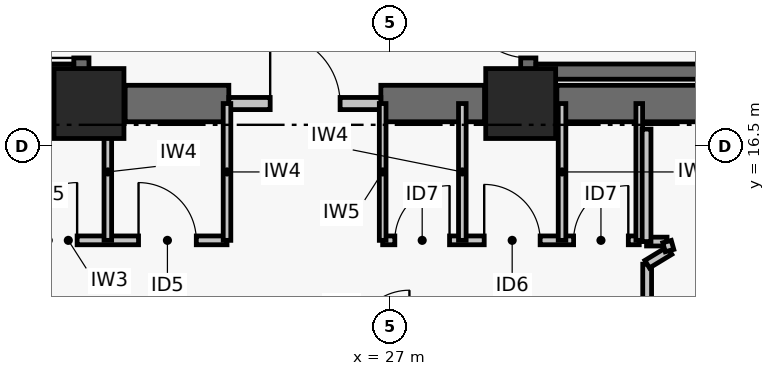
"""IFC4 building model, lengths in metres.
Left out: names, types, materials, properties, quantities, classifications, styles, units other than length and angle.
Written with IfcOpenShell. Run it as: python <this file> out.ifc"""

import sys

from ifc_helpers import new_model, si_unit, direction, frame, frame_2d, origin, origin_2d, place, context, subcontext, project, spatial, rectangle, extrude, element, fill, save


model = new_model("IFC4")
c1 = context("Model", 3, precision=1e-05, world=origin(), true_north=direction((0.0, 1.0)))
c2 = subcontext(c1, "Body", "Model", "MODEL_VIEW")
j1 = project(units=[si_unit("LENGTHUNIT", "METRE"), si_unit("PLANEANGLEUNIT", "RADIAN")], contexts=[c1])
p1 = place(None, origin())
s1 = spatial("IfcSite", under=j1, at=p1, CompositionType="ELEMENT")
p2 = place(p1, origin())
s2 = spatial("IfcBuilding", under=s1, at=p2, CompositionType="ELEMENT")
p3 = place(p2, frame((0.0, 0.0, 38.76)))
s3 = spatial("IfcBuildingStorey", under=s2, at=p3, CompositionType="ELEMENT", Elevation=38.76)
for number, where, z_axis, x_axis in (
    (1, (22.05, 17.2, 0.0), (0.0, 0.0, 1.0), (1.0, 0.0, 0.0)),
    (2, (29.15, 17.2, 0.0), (0.0, 0.0, 1.0), (1.0, 0.0, 0.0)),
):
    element("IfcColumn", number, at=place(p3, frame(where, z_axis=z_axis, x_axis=x_axis)), inside=s3, PredefinedType="COLUMN", context=c2, shape_type="SweptSolid", body=[
        extrude(rectangle(XDim=1.15, YDim=1.15, at=origin_2d()), origin(), (0.0, 0.0, 1.0), 3.72),
    ])
p4 = place(p3, frame((18.395, 17.2, 0.0), z_axis=(0.0, 0.0, 1.0), x_axis=(1.0, 0.0, 0.0)))
e3 = element("IfcWall", 3, at=p4, inside=s3, PredefinedType="SHEAR", context=c2, shape_type="SweptSolid", body=[
    extrude(rectangle(XDim=3.06, YDim=0.6, at=frame_2d((1.53, 0.0))), origin(), (0.0, 0.0, 1.0), 3.47),
])
p5 = place(p3, frame((22.645, 17.2, 0.0), z_axis=(0.0, 0.0, 1.0), x_axis=(1.0, 0.0, 0.0)))
e4 = element("IfcWall", 4, at=p5, inside=s3, PredefinedType="SHEAR", context=c2, shape_type="SweptSolid", body=[
    extrude(rectangle(XDim=1.705, YDim=0.6, at=frame_2d((0.853, 0.0))), origin(), (0.0, 0.0, 1.0), 3.47),
])
p6 = place(p3, frame((26.85, 17.2, 0.0), z_axis=(0.0, 0.0, 1.0), x_axis=(1.0, 0.0, 0.0)))
e5 = element("IfcWall", 5, at=p6, inside=s3, PredefinedType="SHEAR", context=c2, shape_type="SweptSolid", body=[
    extrude(rectangle(XDim=1.705, YDim=0.6, at=frame_2d((0.853, 0.0))), origin(), (0.0, 0.0, 1.0), 3.47),
])
p7 = place(p3, frame((29.745, 17.2, 0.0), z_axis=(0.0, 0.0, 1.0), x_axis=(1.0, 0.0, 0.0)))
e6 = element("IfcWall", 6, at=p7, inside=s3, PredefinedType="SHEAR", context=c2, shape_type="SweptSolid", body=[
    extrude(rectangle(XDim=3.06, YDim=0.6, at=frame_2d((1.53, 0.0))), origin(), (0.0, 0.0, 1.0), 3.47),
])
p8 = place(p3, frame((21.925, 17.6, 0.0), z_axis=(0.0, 0.0, 1.0), x_axis=(0.0, 1.0, 0.0)))
e7 = element("IfcWall", 7, at=p8, inside=s3, PredefinedType="SHEAR", context=c2, shape_type="SweptSolid", body=[
    extrude(rectangle(XDim=8.8, YDim=0.25, at=frame_2d((4.4, 0.0))), origin(), (0.0, 0.0, 1.0), 3.47),
])
p9 = place(p8, frame((0.35, 0.0, 0.0)))
e8 = element("IfcOpeningElement", 8, at=p9, cuts=e7, PredefinedType="OPENING", context=c2, shape_type="SweptSolid", body=[
    extrude(rectangle(XDim=1.05, YDim=2.08, at=frame_2d((0.525, 1.04))), frame((0.0, 0.135, 0.0), z_axis=(0.0, -1.0, 0.0), x_axis=(1.0, 0.0, 0.0)), (0.0, 0.0, 1.0), 0.27),
])
p10 = place(p3, frame((18.354, 17.725, 0.0), z_axis=(0.0, 0.0, 1.0), x_axis=(1.0, 0.0, 0.0)))
e9 = element("IfcWall", 9, at=p10, inside=s3, PredefinedType="SHEAR", context=c2, shape_type="SweptSolid", body=[
    extrude(rectangle(XDim=3.446, YDim=0.25, at=frame_2d((1.723, 0.0))), origin(), (0.0, 0.0, 1.0), 3.47),
])
p11 = place(p3, frame((29.275, 17.6, 0.0), z_axis=(0.0, 0.0, 1.0), x_axis=(0.0, 1.0, 0.0)))
e10 = element("IfcWall", 10, at=p11, inside=s3, PredefinedType="SHEAR", context=c2, shape_type="SweptSolid", body=[
    extrude(rectangle(XDim=8.8, YDim=0.25, at=frame_2d((4.4, 0.0))), origin(), (0.0, 0.0, 1.0), 3.47),
])
p12 = place(p11, frame((0.35, 0.0, 0.0)))
e11 = element("IfcOpeningElement", 11, at=p12, cuts=e10, PredefinedType="OPENING", context=c2, shape_type="SweptSolid", body=[
    extrude(rectangle(XDim=1.05, YDim=2.08, at=frame_2d((0.525, 1.04))), frame((0.0, 0.135, 0.0), z_axis=(0.0, -1.0, 0.0), x_axis=(1.0, 0.0, 0.0)), (0.0, 0.0, 1.0), 0.27),
])
p13 = place(p3, frame((29.4, 17.725, 0.0), z_axis=(0.0, 0.0, 1.0), x_axis=(1.0, 0.0, 0.0)))
e12 = element("IfcWall", 12, at=p13, inside=s3, PredefinedType="SHEAR", context=c2, shape_type="SweptSolid", body=[
    extrude(rectangle(XDim=3.446, YDim=0.25, at=frame_2d((1.723, 0.0))), origin(), (0.0, 0.0, 1.0), 3.47),
])
p14 = place(p3, frame((24.35, 17.2, 0.0), z_axis=(0.0, 0.0, 1.0), x_axis=(1.0, 0.0, 0.0)))
e13 = element("IfcWall", 13, at=p14, inside=s3, PredefinedType="PARTITIONING", context=c2, shape_type="SweptSolid", body=[
    extrude(rectangle(XDim=2.5, YDim=0.2, at=frame_2d((1.25, 0.0))), origin(), (0.0, 0.0, 1.0), 2.6),
])
p15 = place(p14, frame((0.68, 0.0, 0.0)))
e14 = element("IfcOpeningElement", 14, at=p15, cuts=e13, PredefinedType="OPENING", context=c2, shape_type="SweptSolid", body=[
    extrude(rectangle(XDim=1.15, YDim=2.08, at=frame_2d((0.575, 1.04))), frame((0.0, 0.11, 0.0), z_axis=(0.0, -1.0, 0.0), x_axis=(1.0, 0.0, 0.0)), (0.0, 0.0, 1.0), 0.22),
])
p16 = place(p3, frame((19.1, 14.95, 0.0), z_axis=(0.0, 0.0, 1.0), x_axis=(1.0, 0.0, 0.0)))
e15 = element("IfcWall", 15, at=p16, inside=s3, PredefinedType="PARTITIONING", context=c2, shape_type="SweptSolid", body=[
    extrude(rectangle(XDim=5.22, YDim=0.145, at=frame_2d((2.61, 0.0))), origin(), (0.0, 0.0, 1.0), 2.6),
])
p17 = place(p16, frame((0.2, 0.0, 0.0)))
e16 = element("IfcOpeningElement", 16, at=p17, cuts=e15, PredefinedType="OPENING", context=c2, shape_type="SweptSolid", body=[
    extrude(rectangle(XDim=0.9, YDim=2.02, at=frame_2d((0.45, 1.01))), frame((0.0, 0.083, 0.0), z_axis=(0.0, -1.0, 0.0), x_axis=(1.0, 0.0, 0.0)), (0.0, 0.0, 1.0), 0.165),
])
p18 = place(p16, frame((1.805, 0.0, 0.0)))
e17 = element("IfcOpeningElement", 17, at=p18, cuts=e15, PredefinedType="OPENING", context=c2, shape_type="SweptSolid", body=[
    extrude(rectangle(XDim=0.95, YDim=2.06, at=frame_2d((0.475, 1.03))), frame((0.0, 0.083, 0.0), z_axis=(0.0, -1.0, 0.0), x_axis=(1.0, 0.0, 0.0)), (0.0, 0.0, 1.0), 0.165),
])
p19 = place(p16, frame((3.765, 0.0, 0.0)))
e18 = element("IfcOpeningElement", 18, at=p19, cuts=e15, PredefinedType="OPENING", context=c2, shape_type="SweptSolid", body=[
    extrude(rectangle(XDim=0.95, YDim=2.06, at=frame_2d((0.475, 1.03))), frame((0.0, 0.083, 0.0), z_axis=(0.0, -1.0, 0.0), x_axis=(1.0, 0.0, 0.0)), (0.0, 0.0, 1.0), 0.165),
])
p20 = place(p3, frame((26.88, 14.95, 0.0), z_axis=(0.0, 0.0, 1.0), x_axis=(1.0, 0.0, 0.0)))
e19 = element("IfcWall", 19, at=p20, inside=s3, PredefinedType="PARTITIONING", context=c2, shape_type="SweptSolid", body=[
    extrude(rectangle(XDim=4.22, YDim=0.145, at=frame_2d((2.11, 0.0))), origin(), (0.0, 0.0, 1.0), 3.0),
])
p21 = place(p20, frame((0.2, 0.0, 0.0)))
e20 = element("IfcOpeningElement", 20, at=p21, cuts=e19, PredefinedType="OPENING", context=c2, shape_type="SweptSolid", body=[
    extrude(rectangle(XDim=0.9, YDim=2.02, at=frame_2d((0.45, 1.01))), frame((0.0, 0.083, 0.0), z_axis=(0.0, -1.0, 0.0), x_axis=(1.0, 0.0, 0.0)), (0.0, 0.0, 1.0), 0.165),
])
p22 = place(p20, frame((1.67, 0.0, 0.0)))
e21 = element("IfcOpeningElement", 21, at=p22, cuts=e19, PredefinedType="OPENING", context=c2, shape_type="SweptSolid", body=[
    extrude(rectangle(XDim=0.92, YDim=2.05, at=frame_2d((0.46, 1.025))), frame((0.0, 0.083, 0.0), z_axis=(0.0, -1.0, 0.0), x_axis=(1.0, 0.0, 0.0)), (0.0, 0.0, 1.0), 0.165),
])
p23 = place(p20, frame((3.14, 0.0, 0.0)))
e22 = element("IfcOpeningElement", 22, at=p23, cuts=e19, PredefinedType="OPENING", context=c2, shape_type="SweptSolid", body=[
    extrude(rectangle(XDim=0.9, YDim=2.02, at=frame_2d((0.45, 1.01))), frame((0.0, 0.083, 0.0), z_axis=(0.0, -1.0, 0.0), x_axis=(1.0, 0.0, 0.0)), (0.0, 0.0, 1.0), 0.165),
])
for number, where, z_axis, x_axis in (
    (23, (22.36, 14.95, 0.0), (0.0, 0.0, 1.0), (0.0, 1.0, 0.0)),
    (24, (24.32, 14.95, 0.0), (0.0, 0.0, 1.0), (0.0, 1.0, 0.0)),
):
    element("IfcWall", number, at=place(p3, frame(where, z_axis=z_axis, x_axis=x_axis)), inside=s3, PredefinedType="PARTITIONING", context=c2, shape_type="SweptSolid", body=[
        extrude(rectangle(XDim=2.25, YDim=0.125, at=frame_2d((1.125, 0.0))), origin(), (0.0, 0.0, 1.0), 2.6),
    ])
p24 = place(p3, frame((26.88, 14.95, 0.0), z_axis=(0.0, 0.0, 1.0), x_axis=(0.0, 1.0, 0.0)))
e25 = element("IfcWall", 25, at=p24, inside=s3, PredefinedType="PARTITIONING", context=c2, shape_type="SweptSolid", body=[
    extrude(rectangle(XDim=2.25, YDim=0.11, at=frame_2d((1.125, 0.0))), origin(), (0.0, 0.0, 1.0), 2.6),
])
for number, where, z_axis, x_axis in (
    (26, (28.19, 14.95, 0.0), (0.0, 0.0, 1.0), (0.0, 1.0, 0.0)),
    (27, (29.83, 14.95, 0.0), (0.0, 0.0, 1.0), (0.0, 1.0, 0.0)),
):
    element("IfcWall", number, at=place(p3, frame(where, z_axis=z_axis, x_axis=x_axis)), inside=s3, PredefinedType="PARTITIONING", context=c2, shape_type="SweptSolid", body=[
        extrude(rectangle(XDim=2.25, YDim=0.125, at=frame_2d((1.125, 0.0))), origin(), (0.0, 0.0, 1.0), 2.6),
    ])
p25 = place(p3, frame((31.1, 14.95, 0.0), z_axis=(0.0, 0.0, 1.0), x_axis=(0.0, 1.0, 0.0)))
e28 = element("IfcWall", 28, at=p25, inside=s3, PredefinedType="PARTITIONING", context=c2, shape_type="SweptSolid", body=[
    extrude(rectangle(XDim=2.25, YDim=0.11, at=frame_2d((1.125, 0.0))), origin(), (0.0, 0.0, 1.0), 2.6),
])
p26 = place(p3, frame((31.23, 13.29, 0.0), z_axis=(0.0, 0.0, 1.0), x_axis=(0.0, 1.0, 0.0)))
e29 = element("IfcWall", 29, at=p26, inside=s3, PredefinedType="PARTITIONING", context=c2, shape_type="SweptSolid", body=[
    extrude(rectangle(XDim=1.268, YDim=0.145, at=frame_2d((0.634, 0.0))), origin(), (0.0, 0.0, 1.0), 2.85),
])
p27 = place(p3, frame((31.23, 14.558, 0.0), z_axis=(0.0, 0.0, 1.0), x_axis=(0.854931196424, 0.518741408971, 0.0)))
e30 = element("IfcWall", 30, at=p27, inside=s3, PredefinedType="PARTITIONING", context=c2, shape_type="SweptSolid", body=[
    extrude(rectangle(XDim=0.431, YDim=0.145, at=frame_2d((0.215, 0.0))), origin(), (0.0, 0.0, 1.0), 3.0),
])
p28 = place(p3, frame((31.557, 14.93, 0.0), z_axis=(0.0, 0.0, 1.0), x_axis=(-1.0, 0.0, 0.0)))
e31 = element("IfcWall", 31, at=p28, inside=s3, PredefinedType="PARTITIONING", context=c2, shape_type="SweptSolid", body=[
    extrude(rectangle(XDim=0.337, YDim=0.145, at=frame_2d((0.168, 0.0))), origin(), (0.0, 0.0, 1.0), 3.0),
])
p29 = place(p3, frame((31.22, 14.93, 0.0), z_axis=(0.0, 0.0, 1.0), x_axis=(0.0, 1.0, 0.0)))
e32 = element("IfcWall", 32, at=p29, inside=s3, PredefinedType="PARTITIONING", context=c2, shape_type="SweptSolid", body=[
    extrude(rectangle(XDim=1.85, YDim=0.145, at=frame_2d((0.925, 0.0))), origin(), (0.0, 0.0, 1.0), 2.6),
])
p30 = place(p3, frame((31.598, 14.781, 0.0), z_axis=(0.0, 0.0, 1.0), x_axis=(-0.269277388617, 0.963062660464, 0.0)))
e33 = element("IfcWall", 33, at=p30, inside=s3, PredefinedType="PARTITIONING", context=c2, shape_type="SweptSolid", body=[
    extrude(rectangle(XDim=0.154, YDim=0.145, at=frame_2d((0.077, 0.0))), origin(), (0.0, 0.0, 1.0), 3.0),
])
p31 = place(p9, origin())
e34 = element("IfcDoor", 34, at=p31, inside=s3, OperationType="SINGLE_SWING_LEFT", PredefinedType="DOOR", context=c2, shape_type="SweptSolid", body=[
    extrude(rectangle(XDim=1.05, YDim=2.08, at=frame_2d((0.525, 1.04))), frame((0.0, 0.025, 0.0), z_axis=(0.0, -1.0, 0.0), x_axis=(1.0, 0.0, 0.0)), (0.0, 0.0, 1.0), 0.05),
])
fill(e8, e34)
p32 = place(p12, origin())
e35 = element("IfcDoor", 35, at=p32, inside=s3, OperationType="SINGLE_SWING_RIGHT", PredefinedType="DOOR", context=c2, shape_type="SweptSolid", body=[
    extrude(rectangle(XDim=1.05, YDim=2.08, at=frame_2d((0.525, 1.04))), frame((0.0, 0.025, 0.0), z_axis=(0.0, -1.0, 0.0), x_axis=(1.0, 0.0, 0.0)), (0.0, 0.0, 1.0), 0.05),
])
fill(e11, e35)
p33 = place(p15, origin())
e36 = element("IfcDoor", 36, at=p33, inside=s3, OperationType="SINGLE_SWING_LEFT", PredefinedType="DOOR", context=c2, shape_type="SweptSolid", body=[
    extrude(rectangle(XDim=1.15, YDim=2.08, at=frame_2d((0.575, 1.04))), frame((0.0, 0.025, 0.0), z_axis=(0.0, -1.0, 0.0), x_axis=(1.0, 0.0, 0.0)), (0.0, 0.0, 1.0), 0.05),
])
fill(e14, e36)
p34 = place(p18, origin())
e37 = element("IfcDoor", 37, at=p34, inside=s3, OperationType="SINGLE_SWING_RIGHT", PredefinedType="DOOR", context=c2, shape_type="SweptSolid", body=[
    extrude(rectangle(XDim=0.95, YDim=2.06, at=frame_2d((0.475, 1.03))), frame((0.0, 0.025, 0.0), z_axis=(0.0, -1.0, 0.0), x_axis=(1.0, 0.0, 0.0)), (0.0, 0.0, 1.0), 0.05),
])
fill(e17, e37)
p35 = place(p19, origin())
e38 = element("IfcDoor", 38, at=p35, inside=s3, OperationType="SINGLE_SWING_LEFT", PredefinedType="DOOR", context=c2, shape_type="SweptSolid", body=[
    extrude(rectangle(XDim=0.95, YDim=2.06, at=frame_2d((0.475, 1.03))), frame((0.0, 0.025, 0.0), z_axis=(0.0, -1.0, 0.0), x_axis=(1.0, 0.0, 0.0)), (0.0, 0.0, 1.0), 0.05),
])
fill(e18, e38)
p36 = place(p21, origin())
e39 = element("IfcDoor", 39, at=p36, inside=s3, OperationType="SINGLE_SWING_RIGHT", PredefinedType="DOOR", context=c2, shape_type="SweptSolid", body=[
    extrude(rectangle(XDim=0.9, YDim=2.02, at=frame_2d((0.45, 1.01))), frame((0.0, 0.025, 0.0), z_axis=(0.0, -1.0, 0.0), x_axis=(1.0, 0.0, 0.0)), (0.0, 0.0, 1.0), 0.05),
])
fill(e20, e39)
p37 = place(p22, origin())
e40 = element("IfcDoor", 40, at=p37, inside=s3, OperationType="SINGLE_SWING_LEFT", PredefinedType="DOOR", context=c2, shape_type="SweptSolid", body=[
    extrude(rectangle(XDim=0.92, YDim=2.05, at=frame_2d((0.46, 1.025))), frame((0.0, 0.025, 0.0), z_axis=(0.0, -1.0, 0.0), x_axis=(1.0, 0.0, 0.0)), (0.0, 0.0, 1.0), 0.05),
])
fill(e21, e40)
p38 = place(p23, origin())
e41 = element("IfcDoor", 41, at=p38, inside=s3, OperationType="SINGLE_SWING_RIGHT", PredefinedType="DOOR", context=c2, shape_type="SweptSolid", body=[
    extrude(rectangle(XDim=0.9, YDim=2.02, at=frame_2d((0.45, 1.01))), frame((0.0, 0.025, 0.0), z_axis=(0.0, -1.0, 0.0), x_axis=(1.0, 0.0, 0.0)), (0.0, 0.0, 1.0), 0.05),
])
fill(e22, e41)
save(model, sys.argv[1])
